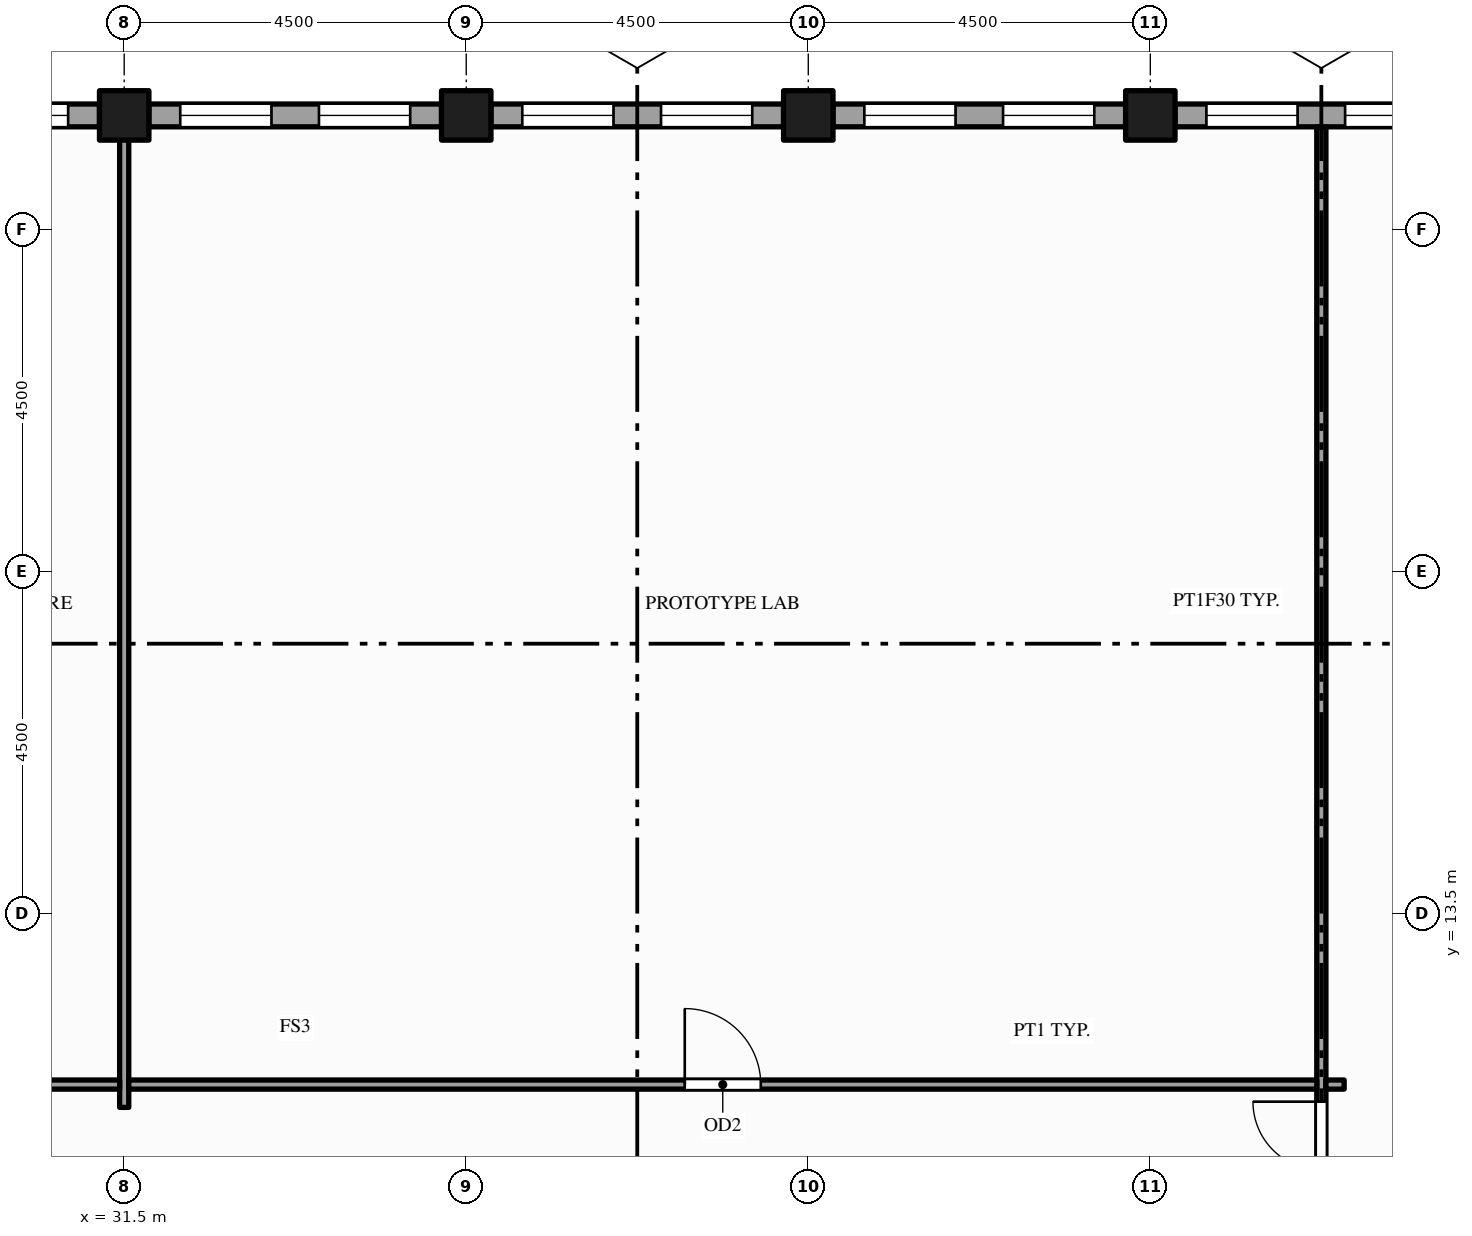
"""IFC4 building model, lengths in metres.
Left out: names, types, materials, properties, quantities, classifications, styles, units other than length and angle.
Written with IfcOpenShell. Run it as: python <this file> out.ifc"""

import sys

from ifc_helpers import new_model, si_unit, direction, frame, frame_2d, origin, origin_2d, place, context, subcontext, project, spatial, rectangle, hollow_rectangle, extrude, element, fill, save


model = new_model("IFC4")
c1 = context("Model", 3, precision=1e-05, world=origin(), true_north=direction((0.0, 1.0)))
c2 = subcontext(c1, "Body", "Model", "MODEL_VIEW")
j1 = project(units=[si_unit("LENGTHUNIT", "METRE"), si_unit("PLANEANGLEUNIT", "RADIAN")], contexts=[c1])
p1 = place(None, origin())
s1 = spatial("IfcSite", under=j1, at=p1, CompositionType="ELEMENT")
p2 = place(p1, origin())
s2 = spatial("IfcBuilding", under=s1, at=p2, CompositionType="ELEMENT")
p3 = place(p2, frame((0.0, 0.0, 289.0)))
s3 = spatial("IfcBuildingStorey", under=s2, at=p3, CompositionType="ELEMENT", Elevation=289.0)
for number, where, z_axis, x_axis in (
    (1, (31.5, 24.0, -0.15), (0.0, 0.0, 1.0), (1.0, 0.0, 0.0)),
    (2, (36.0, 24.0, -0.15), (0.0, 0.0, 1.0), (1.0, 0.0, 0.0)),
    (3, (40.5, 24.0, -0.15), (0.0, 0.0, 1.0), (1.0, 0.0, 0.0)),
    (4, (45.0, 24.0, -0.15), (0.0, 0.0, 1.0), (1.0, 0.0, 0.0)),
):
    element("IfcColumn", number, at=place(p3, frame(where, z_axis=z_axis, x_axis=x_axis)), inside=s3, PredefinedType="COLUMN", context=c2, shape_type="SweptSolid", body=[
        extrude(hollow_rectangle(XDim=0.65, YDim=0.65, WallThickness=0.032, at=origin_2d()), origin(), (0.0, 0.0, 1.0), 4.0),
    ])
p4 = place(p3, frame((49.175, 24.0, 0.0), z_axis=(0.0, 0.0, 1.0), x_axis=(-1.0, 0.0, 0.0)))
e5 = element("IfcWall", 5, at=p4, inside=s3, PredefinedType="STANDARD", context=c2, shape_type="SweptSolid", body=[
    extrude(rectangle(XDim=3.85, YDim=0.3, at=frame_2d((1.925, 0.0))), origin(), (0.0, 0.0, 1.0), 2.87),
])
p5 = place(p4, frame((0.413, 0.0, 0.9)))
e6 = element("IfcOpeningElement", 6, at=p5, cuts=e5, PredefinedType="OPENING", context=c2, shape_type="SweptSolid", body=[
    extrude(rectangle(XDim=1.2, YDim=1.75, at=frame_2d((0.6, 0.875))), frame((0.0, 0.16, 0.0), z_axis=(0.0, -1.0, 0.0), x_axis=(1.0, 0.0, 0.0)), (0.0, 0.0, 1.0), 0.32),
])
p6 = place(p4, frame((2.238, 0.0, 0.9)))
e7 = element("IfcOpeningElement", 7, at=p6, cuts=e5, PredefinedType="OPENING", context=c2, shape_type="SweptSolid", body=[
    extrude(rectangle(XDim=1.2, YDim=1.75, at=frame_2d((0.6, 0.875))), frame((0.0, 0.16, 0.0), z_axis=(0.0, -1.0, 0.0), x_axis=(1.0, 0.0, 0.0)), (0.0, 0.0, 1.0), 0.32),
])
p7 = place(p3, frame((44.675, 24.0, 0.0), z_axis=(0.0, 0.0, 1.0), x_axis=(-1.0, 0.0, 0.0)))
e8 = element("IfcWall", 8, at=p7, inside=s3, PredefinedType="STANDARD", context=c2, shape_type="SweptSolid", body=[
    extrude(rectangle(XDim=3.85, YDim=0.3, at=frame_2d((1.925, 0.0))), origin(), (0.0, 0.0, 1.0), 2.87),
])
p8 = place(p7, frame((0.413, 0.0, 0.9)))
e9 = element("IfcOpeningElement", 9, at=p8, cuts=e8, PredefinedType="OPENING", context=c2, shape_type="SweptSolid", body=[
    extrude(rectangle(XDim=1.2, YDim=1.75, at=frame_2d((0.6, 0.875))), frame((0.0, 0.16, 0.0), z_axis=(0.0, -1.0, 0.0), x_axis=(1.0, 0.0, 0.0)), (0.0, 0.0, 1.0), 0.32),
])
p9 = place(p7, frame((2.238, 0.0, 0.9)))
e10 = element("IfcOpeningElement", 10, at=p9, cuts=e8, PredefinedType="OPENING", context=c2, shape_type="SweptSolid", body=[
    extrude(rectangle(XDim=1.2, YDim=1.75, at=frame_2d((0.6, 0.875))), frame((0.0, 0.16, 0.0), z_axis=(0.0, -1.0, 0.0), x_axis=(1.0, 0.0, 0.0)), (0.0, 0.0, 1.0), 0.32),
])
p10 = place(p3, frame((40.175, 24.0, 0.0), z_axis=(0.0, 0.0, 1.0), x_axis=(-1.0, 0.0, 0.0)))
e11 = element("IfcWall", 11, at=p10, inside=s3, PredefinedType="STANDARD", context=c2, shape_type="SweptSolid", body=[
    extrude(rectangle(XDim=3.85, YDim=0.3, at=frame_2d((1.925, 0.0))), origin(), (0.0, 0.0, 1.0), 2.87),
])
p11 = place(p10, frame((0.413, 0.0, 0.9)))
e12 = element("IfcOpeningElement", 12, at=p11, cuts=e11, PredefinedType="OPENING", context=c2, shape_type="SweptSolid", body=[
    extrude(rectangle(XDim=1.2, YDim=1.75, at=frame_2d((0.6, 0.875))), frame((0.0, 0.16, 0.0), z_axis=(0.0, -1.0, 0.0), x_axis=(1.0, 0.0, 0.0)), (0.0, 0.0, 1.0), 0.32),
])
p12 = place(p10, frame((2.238, 0.0, 0.9)))
e13 = element("IfcOpeningElement", 13, at=p12, cuts=e11, PredefinedType="OPENING", context=c2, shape_type="SweptSolid", body=[
    extrude(rectangle(XDim=1.2, YDim=1.75, at=frame_2d((0.6, 0.875))), frame((0.0, 0.16, 0.0), z_axis=(0.0, -1.0, 0.0), x_axis=(1.0, 0.0, 0.0)), (0.0, 0.0, 1.0), 0.32),
])
p13 = place(p3, frame((35.675, 24.0, 0.0), z_axis=(0.0, 0.0, 1.0), x_axis=(-1.0, 0.0, 0.0)))
e14 = element("IfcWall", 14, at=p13, inside=s3, PredefinedType="STANDARD", context=c2, shape_type="SweptSolid", body=[
    extrude(rectangle(XDim=3.85, YDim=0.3, at=frame_2d((1.925, 0.0))), origin(), (0.0, 0.0, 1.0), 2.87),
])
p14 = place(p13, frame((0.413, 0.0, 0.9)))
e15 = element("IfcOpeningElement", 15, at=p14, cuts=e14, PredefinedType="OPENING", context=c2, shape_type="SweptSolid", body=[
    extrude(rectangle(XDim=1.2, YDim=1.75, at=frame_2d((0.6, 0.875))), frame((0.0, 0.16, 0.0), z_axis=(0.0, -1.0, 0.0), x_axis=(1.0, 0.0, 0.0)), (0.0, 0.0, 1.0), 0.32),
])
p15 = place(p13, frame((2.238, 0.0, 0.9)))
e16 = element("IfcOpeningElement", 16, at=p15, cuts=e14, PredefinedType="OPENING", context=c2, shape_type="SweptSolid", body=[
    extrude(rectangle(XDim=1.2, YDim=1.75, at=frame_2d((0.6, 0.875))), frame((0.0, 0.16, 0.0), z_axis=(0.0, -1.0, 0.0), x_axis=(1.0, 0.0, 0.0)), (0.0, 0.0, 1.0), 0.32),
])
p16 = place(p3, frame((31.175, 24.0, 0.0), z_axis=(0.0, 0.0, 1.0), x_axis=(-1.0, 0.0, 0.0)))
e17 = element("IfcWall", 17, at=p16, inside=s3, PredefinedType="STANDARD", context=c2, shape_type="SweptSolid", body=[
    extrude(rectangle(XDim=3.85, YDim=0.3, at=frame_2d((1.925, 0.0))), origin(), (0.0, 0.0, 1.0), 2.87),
])
p17 = place(p16, frame((0.413, 0.0, 0.9)))
e18 = element("IfcOpeningElement", 18, at=p17, cuts=e17, PredefinedType="OPENING", context=c2, shape_type="SweptSolid", body=[
    extrude(rectangle(XDim=1.2, YDim=1.75, at=frame_2d((0.6, 0.875))), frame((0.0, 0.16, 0.0), z_axis=(0.0, -1.0, 0.0), x_axis=(1.0, 0.0, 0.0)), (0.0, 0.0, 1.0), 0.32),
])
p18 = place(p16, frame((2.238, 0.0, 0.9)))
e19 = element("IfcOpeningElement", 19, at=p18, cuts=e17, PredefinedType="OPENING", context=c2, shape_type="SweptSolid", body=[
    extrude(rectangle(XDim=1.2, YDim=1.75, at=frame_2d((0.6, 0.875))), frame((0.0, 0.16, 0.0), z_axis=(0.0, -1.0, 0.0), x_axis=(1.0, 0.0, 0.0)), (0.0, 0.0, 1.0), 0.32),
])
p19 = place(p3, frame((31.5, 10.95, 0.0), z_axis=(0.0, 0.0, 1.0), x_axis=(0.0, 1.0, 0.0)))
e20 = element("IfcWall", 20, at=p19, inside=s3, PredefinedType="PARTITIONING", context=c2, shape_type="SweptSolid", body=[
    extrude(rectangle(XDim=12.9, YDim=0.12, at=frame_2d((6.45, 0.0))), origin(), (0.0, 0.0, 1.0), 2.87),
])
p20 = place(p3, frame((47.25, 1.65, 0.0), z_axis=(0.0, 0.0, 1.0), x_axis=(0.0, 1.0, 0.0)))
e21 = element("IfcWall", 21, at=p20, inside=s3, PredefinedType="PARTITIONING", context=c2, shape_type="SweptSolid", body=[
    extrude(rectangle(XDim=22.2, YDim=0.12, at=frame_2d((11.1, 0.0))), origin(), (0.0, 0.0, 1.0), 2.87),
])
p21 = place(p20, frame((7.575, 0.0, 0.0)))
e22 = element("IfcOpeningElement", 22, at=p21, cuts=e21, PredefinedType="OPENING", context=c2, shape_type="SweptSolid", body=[
    extrude(rectangle(XDim=1.8, YDim=2.1, at=frame_2d((0.9, 1.05))), frame((0.0, 0.07, 0.0), z_axis=(0.0, -1.0, 0.0), x_axis=(1.0, 0.0, 0.0)), (0.0, 0.0, 1.0), 0.14),
])
p22 = place(p20, frame((0.85, 0.0, 0.0)))
e23 = element("IfcOpeningElement", 23, at=p22, cuts=e21, PredefinedType="OPENING", context=c2, shape_type="SweptSolid", body=[
    extrude(rectangle(XDim=0.9, YDim=2.1, at=frame_2d((0.45, 1.05))), frame((0.0, 0.07, 0.0), z_axis=(0.0, -1.0, 0.0), x_axis=(1.0, 0.0, 0.0)), (0.0, 0.0, 1.0), 0.14),
])
p23 = place(p20, frame((3.15, 0.0, 0.0)))
e24 = element("IfcOpeningElement", 24, at=p23, cuts=e21, PredefinedType="OPENING", context=c2, shape_type="SweptSolid", body=[
    extrude(rectangle(XDim=0.9, YDim=2.1, at=frame_2d((0.45, 1.05))), frame((0.0, 0.07, 0.0), z_axis=(0.0, -1.0, 0.0), x_axis=(1.0, 0.0, 0.0)), (0.0, 0.0, 1.0), 0.14),
])
p24 = place(p20, frame((5.35, 0.0, 0.0)))
e25 = element("IfcOpeningElement", 25, at=p24, cuts=e21, PredefinedType="OPENING", context=c2, shape_type="SweptSolid", body=[
    extrude(rectangle(XDim=1.0, YDim=2.1, at=frame_2d((0.5, 1.05))), frame((0.0, 0.07, 0.0), z_axis=(0.0, -1.0, 0.0), x_axis=(1.0, 0.0, 0.0)), (0.0, 0.0, 1.0), 0.14),
])
p25 = place(p3, frame((27.06, 11.25, 0.0), z_axis=(0.0, 0.0, 1.0), x_axis=(1.0, 0.0, 0.0)))
e26 = element("IfcWall", 26, at=p25, inside=s3, PredefinedType="PARTITIONING", context=c2, shape_type="SweptSolid", body=[
    extrude(rectangle(XDim=4.38, YDim=0.12, at=frame_2d((2.19, 0.0))), origin(), (0.0, 0.0, 1.0), 2.87),
])
p26 = place(p25, frame((1.74, 0.0, 0.0)))
e27 = element("IfcOpeningElement", 27, at=p26, cuts=e26, PredefinedType="OPENING", context=c2, shape_type="SweptSolid", body=[
    extrude(rectangle(XDim=0.9, YDim=2.1, at=frame_2d((0.45, 1.05))), frame((0.0, 0.07, 0.0), z_axis=(0.0, -1.0, 0.0), x_axis=(1.0, 0.0, 0.0)), (0.0, 0.0, 1.0), 0.14),
])
p27 = place(p3, frame((31.56, 11.25, 0.0), z_axis=(0.0, 0.0, 1.0), x_axis=(1.0, 0.0, 0.0)))
e28 = element("IfcWall", 28, at=p27, inside=s3, PredefinedType="PARTITIONING", context=c2, shape_type="SweptSolid", body=[
    extrude(rectangle(XDim=15.63, YDim=0.12, at=frame_2d((7.815, 0.0))), origin(), (0.0, 0.0, 1.0), 2.87),
])
p28 = place(p27, frame((7.315, 0.0, 0.0)))
e29 = element("IfcOpeningElement", 29, at=p28, cuts=e28, PredefinedType="OPENING", context=c2, shape_type="SweptSolid", body=[
    extrude(rectangle(XDim=1.0, YDim=2.1, at=frame_2d((0.5, 1.05))), frame((0.0, 0.07, 0.0), z_axis=(0.0, -1.0, 0.0), x_axis=(1.0, 0.0, 0.0)), (0.0, 0.0, 1.0), 0.14),
])
p29 = place(p3, frame((47.31, 11.25, 0.0), z_axis=(0.0, 0.0, 1.0), x_axis=(1.0, 0.0, 0.0)))
e30 = element("IfcWall", 30, at=p29, inside=s3, PredefinedType="PARTITIONING", context=c2, shape_type="SweptSolid", body=[
    extrude(rectangle(XDim=0.24, YDim=0.12, at=frame_2d((0.12, 0.0))), origin(), (0.0, 0.0, 1.0), 2.87),
])
p30 = place(p5, origin())
e31 = element("IfcWindow", 31, at=p30, inside=s3, PartitioningType="SINGLE_PANEL", PredefinedType="WINDOW", context=c2, shape_type="SweptSolid", body=[
    extrude(rectangle(XDim=1.2, YDim=1.75, at=frame_2d((0.6, 0.875))), frame((0.0, 0.03, 0.0), z_axis=(0.0, -1.0, 0.0), x_axis=(1.0, 0.0, 0.0)), (0.0, 0.0, 1.0), 0.06),
])
fill(e6, e31)
p31 = place(p6, origin())
e32 = element("IfcWindow", 32, at=p31, inside=s3, PartitioningType="SINGLE_PANEL", PredefinedType="WINDOW", context=c2, shape_type="SweptSolid", body=[
    extrude(rectangle(XDim=1.2, YDim=1.75, at=frame_2d((0.6, 0.875))), frame((0.0, 0.03, 0.0), z_axis=(0.0, -1.0, 0.0), x_axis=(1.0, 0.0, 0.0)), (0.0, 0.0, 1.0), 0.06),
])
fill(e7, e32)
p32 = place(p8, origin())
e33 = element("IfcWindow", 33, at=p32, inside=s3, PartitioningType="SINGLE_PANEL", PredefinedType="WINDOW", context=c2, shape_type="SweptSolid", body=[
    extrude(rectangle(XDim=1.2, YDim=1.75, at=frame_2d((0.6, 0.875))), frame((0.0, 0.03, 0.0), z_axis=(0.0, -1.0, 0.0), x_axis=(1.0, 0.0, 0.0)), (0.0, 0.0, 1.0), 0.06),
])
fill(e9, e33)
p33 = place(p9, origin())
e34 = element("IfcWindow", 34, at=p33, inside=s3, PartitioningType="SINGLE_PANEL", PredefinedType="WINDOW", context=c2, shape_type="SweptSolid", body=[
    extrude(rectangle(XDim=1.2, YDim=1.75, at=frame_2d((0.6, 0.875))), frame((0.0, 0.03, 0.0), z_axis=(0.0, -1.0, 0.0), x_axis=(1.0, 0.0, 0.0)), (0.0, 0.0, 1.0), 0.06),
])
fill(e10, e34)
p34 = place(p11, origin())
e35 = element("IfcWindow", 35, at=p34, inside=s3, PartitioningType="SINGLE_PANEL", PredefinedType="WINDOW", context=c2, shape_type="SweptSolid", body=[
    extrude(rectangle(XDim=1.2, YDim=1.75, at=frame_2d((0.6, 0.875))), frame((0.0, 0.03, 0.0), z_axis=(0.0, -1.0, 0.0), x_axis=(1.0, 0.0, 0.0)), (0.0, 0.0, 1.0), 0.06),
])
fill(e12, e35)
p35 = place(p12, origin())
e36 = element("IfcWindow", 36, at=p35, inside=s3, PartitioningType="SINGLE_PANEL", PredefinedType="WINDOW", context=c2, shape_type="SweptSolid", body=[
    extrude(rectangle(XDim=1.2, YDim=1.75, at=frame_2d((0.6, 0.875))), frame((0.0, 0.03, 0.0), z_axis=(0.0, -1.0, 0.0), x_axis=(1.0, 0.0, 0.0)), (0.0, 0.0, 1.0), 0.06),
])
fill(e13, e36)
p36 = place(p14, origin())
e37 = element("IfcWindow", 37, at=p36, inside=s3, PartitioningType="SINGLE_PANEL", PredefinedType="WINDOW", context=c2, shape_type="SweptSolid", body=[
    extrude(rectangle(XDim=1.2, YDim=1.75, at=frame_2d((0.6, 0.875))), frame((0.0, 0.03, 0.0), z_axis=(0.0, -1.0, 0.0), x_axis=(1.0, 0.0, 0.0)), (0.0, 0.0, 1.0), 0.06),
])
fill(e15, e37)
p37 = place(p15, origin())
e38 = element("IfcWindow", 38, at=p37, inside=s3, PartitioningType="SINGLE_PANEL", PredefinedType="WINDOW", context=c2, shape_type="SweptSolid", body=[
    extrude(rectangle(XDim=1.2, YDim=1.75, at=frame_2d((0.6, 0.875))), frame((0.0, 0.03, 0.0), z_axis=(0.0, -1.0, 0.0), x_axis=(1.0, 0.0, 0.0)), (0.0, 0.0, 1.0), 0.06),
])
fill(e16, e38)
p38 = place(p17, origin())
e39 = element("IfcWindow", 39, at=p38, inside=s3, PartitioningType="SINGLE_PANEL", PredefinedType="WINDOW", context=c2, shape_type="SweptSolid", body=[
    extrude(rectangle(XDim=1.2, YDim=1.75, at=frame_2d((0.6, 0.875))), frame((0.0, 0.03, 0.0), z_axis=(0.0, -1.0, 0.0), x_axis=(1.0, 0.0, 0.0)), (0.0, 0.0, 1.0), 0.06),
])
fill(e18, e39)
p39 = place(p21, origin())
e40 = element("IfcDoor", 40, at=p39, inside=s3, OperationType="DOUBLE_DOOR_SINGLE_SWING", PredefinedType="DOOR", context=c2, shape_type="SweptSolid", body=[
    extrude(rectangle(XDim=1.8, YDim=2.1, at=frame_2d((0.9, 1.05))), frame((0.0, 0.025, 0.0), z_axis=(0.0, -1.0, 0.0), x_axis=(1.0, 0.0, 0.0)), (0.0, 0.0, 1.0), 0.05),
])
fill(e22, e40)
p40 = place(p28, origin())
e41 = element("IfcDoor", 41, at=p40, inside=s3, OperationType="SINGLE_SWING_LEFT", PredefinedType="DOOR", context=c2, shape_type="SweptSolid", body=[
    extrude(rectangle(XDim=1.0, YDim=2.1, at=frame_2d((0.5, 1.05))), frame((0.0, 0.025, 0.0), z_axis=(0.0, -1.0, 0.0), x_axis=(1.0, 0.0, 0.0)), (0.0, 0.0, 1.0), 0.05),
])
fill(e29, e41)
save(model, sys.argv[1])
